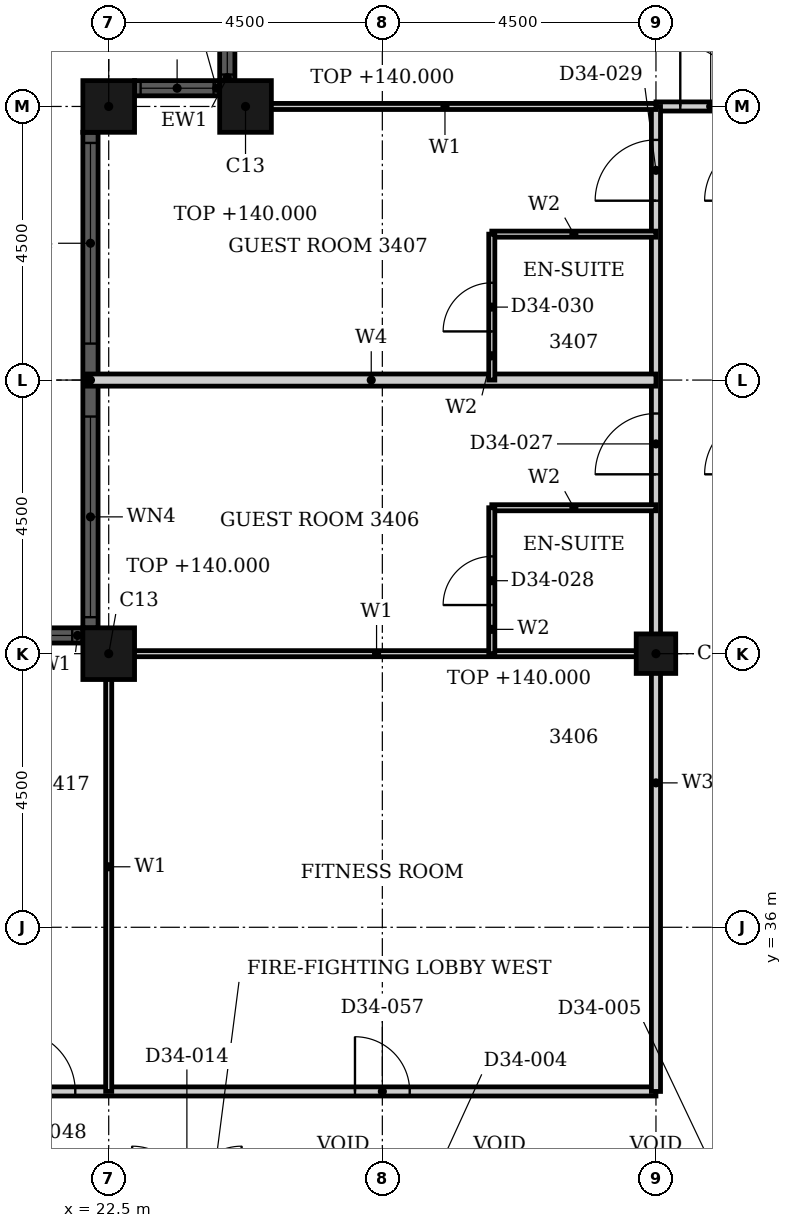
"""IFC4 building model, lengths in metres.
Left out: names, types, materials, properties, quantities, classifications, styles, units other than length and angle.
Written with IfcOpenShell. Run it as: python <this file> out.ifc"""

import sys

from ifc_helpers import new_model, si_unit, direction, frame, frame_2d, origin, origin_2d, place, context, subcontext, project, spatial, rectangle, hollow_rectangle, extrude, element, fill, save


model = new_model("IFC4")
c1 = context("Model", 3, precision=1e-05, world=origin(), true_north=direction((0.0, 1.0)))
c2 = subcontext(c1, "Body", "Model", "MODEL_VIEW")
j1 = project(units=[si_unit("LENGTHUNIT", "METRE"), si_unit("PLANEANGLEUNIT", "RADIAN")], contexts=[c1])
p1 = place(None, origin())
s1 = spatial("IfcSite", under=j1, at=p1, CompositionType="ELEMENT")
p2 = place(p1, origin())
s2 = spatial("IfcBuilding", under=s1, at=p2, CompositionType="ELEMENT")
p3 = place(p2, frame((0.0, 0.0, 136.8)))
s3 = spatial("IfcBuildingStorey", under=s2, at=p3, CompositionType="ELEMENT", Elevation=136.8)
for number, where, z_axis, x_axis in (
    (1, (24.75, 49.5, 0.0), (0.0, 0.0, 1.0), (1.0, 0.0, 0.0)),
    (2, (22.5, 49.5, 0.0), (0.0, 0.0, 1.0), (1.0, 0.0, 0.0)),
    (3, (22.5, 40.5, 0.0), (0.0, 0.0, 1.0), (1.0, 0.0, 0.0)),
):
    element("IfcColumn", number, at=place(p3, frame(where, z_axis=z_axis, x_axis=x_axis)), inside=s3, PredefinedType="COLUMN", context=c2, shape_type="SweptSolid", body=[
        extrude(hollow_rectangle(XDim=0.85, YDim=0.85, WallThickness=0.026, at=origin_2d()), origin(), (0.0, 0.0, 1.0), 3.2),
    ])
p4 = place(p3, frame((31.5, 40.5, 0.0), z_axis=(0.0, 0.0, 1.0), x_axis=(1.0, 0.0, 0.0)))
e4 = element("IfcColumn", 4, at=p4, inside=s3, PredefinedType="COLUMN", context=c2, shape_type="SweptSolid", body=[
    extrude(hollow_rectangle(XDim=0.65, YDim=0.65, WallThickness=0.021, at=origin_2d()), origin(), (0.0, 0.0, 1.0), 3.2),
])
p5 = place(p3, frame((24.45, 51.325, 0.0), z_axis=(0.0, 0.0, 1.0), x_axis=(0.0, -1.0, 0.0)))
e5 = element("IfcWall", 5, at=p5, inside=s3, PredefinedType="SOLIDWALL", context=c2, shape_type="SweptSolid", body=[
    extrude(rectangle(XDim=1.4, YDim=0.25, at=frame_2d((0.7, 0.0))), origin(), (0.0, 0.0, 1.0), 3.6),
])
p6 = place(p5, frame((0.1, 0.0, 0.9)))
e6 = element("IfcOpeningElement", 6, at=p6, cuts=e5, PredefinedType="OPENING", context=c2, shape_type="SweptSolid", body=[
    extrude(rectangle(XDim=1.2, YDim=2.08, at=frame_2d((0.6, 1.04))), frame((0.0, 0.135, 0.0), z_axis=(0.0, -1.0, 0.0), x_axis=(1.0, 0.0, 0.0)), (0.0, 0.0, 1.0), 0.27),
])
p7 = place(p3, frame((24.325, 49.8, 0.0), z_axis=(0.0, 0.0, 1.0), x_axis=(-1.0, 0.0, 0.0)))
e7 = element("IfcWall", 7, at=p7, inside=s3, PredefinedType="SOLIDWALL", context=c2, shape_type="SweptSolid", body=[
    extrude(rectangle(XDim=1.4, YDim=0.25, at=frame_2d((0.7, 0.0))), origin(), (0.0, 0.0, 1.0), 3.6),
])
p8 = place(p7, frame((0.1, 0.0, 0.9)))
e8 = element("IfcOpeningElement", 8, at=p8, cuts=e7, PredefinedType="OPENING", context=c2, shape_type="SweptSolid", body=[
    extrude(rectangle(XDim=1.2, YDim=2.08, at=frame_2d((0.6, 1.04))), frame((0.0, 0.135, 0.0), z_axis=(0.0, -1.0, 0.0), x_axis=(1.0, 0.0, 0.0)), (0.0, 0.0, 1.0), 0.27),
])
p9 = place(p3, frame((22.2, 49.075, 0.0), z_axis=(0.0, 0.0, 1.0), x_axis=(0.0, -1.0, 0.0)))
e9 = element("IfcWall", 9, at=p9, inside=s3, PredefinedType="SOLIDWALL", context=c2, shape_type="SweptSolid", body=[
    extrude(rectangle(XDim=8.15, YDim=0.25, at=frame_2d((4.075, 0.0))), origin(), (0.0, 0.0, 1.0), 3.6),
])
p10 = place(p9, frame((0.175, 0.0, 0.9)))
e10 = element("IfcOpeningElement", 10, at=p10, cuts=e9, PredefinedType="OPENING", context=c2, shape_type="SweptSolid", body=[
    extrude(rectangle(XDim=3.3, YDim=2.08, at=frame_2d((1.65, 1.04))), frame((0.0, 0.135, 0.0), z_axis=(0.0, -1.0, 0.0), x_axis=(1.0, 0.0, 0.0)), (0.0, 0.0, 1.0), 0.27),
])
p11 = place(p9, frame((4.675, 0.0, 0.9)))
e11 = element("IfcOpeningElement", 11, at=p11, cuts=e9, PredefinedType="OPENING", context=c2, shape_type="SweptSolid", body=[
    extrude(rectangle(XDim=3.3, YDim=2.08, at=frame_2d((1.65, 1.04))), frame((0.0, 0.135, 0.0), z_axis=(0.0, -1.0, 0.0), x_axis=(1.0, 0.0, 0.0)), (0.0, 0.0, 1.0), 0.27),
])
p12 = place(p3, frame((22.075, 40.8, 0.0), z_axis=(0.0, 0.0, 1.0), x_axis=(-1.0, 0.0, 0.0)))
e12 = element("IfcWall", 12, at=p12, inside=s3, PredefinedType="SOLIDWALL", context=c2, shape_type="SweptSolid", body=[
    extrude(rectangle(XDim=3.65, YDim=0.25, at=frame_2d((1.825, 0.0))), origin(), (0.0, 0.0, 1.0), 3.6),
])
p13 = place(p12, frame((0.175, 0.0, 0.9)))
e13 = element("IfcOpeningElement", 13, at=p13, cuts=e12, PredefinedType="OPENING", context=c2, shape_type="SweptSolid", body=[
    extrude(rectangle(XDim=3.3, YDim=1.35, at=frame_2d((1.65, 0.675))), frame((0.0, 0.135, 0.0), z_axis=(0.0, -1.0, 0.0), x_axis=(1.0, 0.0, 0.0)), (0.0, 0.0, 1.0), 0.27),
])
p14 = place(p3, frame((16.2, 33.3, 0.0), z_axis=(0.0, 0.0, 1.0), x_axis=(1.0, 0.0, 0.0)))
e14 = element("IfcWall", 14, at=p14, inside=s3, PredefinedType="PARTITIONING", context=c2, shape_type="SweptSolid", body=[
    extrude(rectangle(XDim=15.3, YDim=0.15, at=frame_2d((7.65, 0.0))), origin(), (0.0, 0.0, 1.0), 3.2),
])
p15 = place(p14, frame((4.75, 0.0, 0.0)))
e15 = element("IfcOpeningElement", 15, at=p15, cuts=e14, PredefinedType="OPENING", context=c2, shape_type="SweptSolid", body=[
    extrude(rectangle(XDim=1.0, YDim=2.1, at=frame_2d((0.5, 1.05))), frame((0.0, 0.085, 0.0), z_axis=(0.0, -1.0, 0.0), x_axis=(1.0, 0.0, 0.0)), (0.0, 0.0, 1.0), 0.17),
])
p16 = place(p14, frame((10.35, 0.0, 0.0)))
e16 = element("IfcOpeningElement", 16, at=p16, cuts=e14, PredefinedType="OPENING", context=c2, shape_type="SweptSolid", body=[
    extrude(rectangle(XDim=0.9, YDim=2.1, at=frame_2d((0.45, 1.05))), frame((0.0, 0.085, 0.0), z_axis=(0.0, -1.0, 0.0), x_axis=(1.0, 0.0, 0.0)), (0.0, 0.0, 1.0), 0.17),
])
p17 = place(p3, frame((31.5, 49.5, 0.0), z_axis=(0.0, 0.0, 1.0), x_axis=(1.0, 0.0, 0.0)))
e17 = element("IfcWall", 17, at=p17, inside=s3, PredefinedType="PARTITIONING", context=c2, shape_type="SweptSolid", body=[
    extrude(rectangle(XDim=1.8, YDim=0.15, at=frame_2d((0.9, 0.0))), origin(), (0.0, 0.0, 1.0), 3.2),
])
p18 = place(p17, frame((0.4, 0.0, 0.0)))
e18 = element("IfcOpeningElement", 18, at=p18, cuts=e17, PredefinedType="OPENING", context=c2, shape_type="SweptSolid", body=[
    extrude(rectangle(XDim=1.0, YDim=2.1, at=frame_2d((0.5, 1.05))), frame((0.0, 0.085, 0.0), z_axis=(0.0, -1.0, 0.0), x_axis=(1.0, 0.0, 0.0)), (0.0, 0.0, 1.0), 0.17),
])
p19 = place(p3, frame((31.5, 33.3, 0.0), z_axis=(0.0, 0.0, 1.0), x_axis=(0.0, 1.0, 0.0)))
e19 = element("IfcWall", 19, at=p19, inside=s3, PredefinedType="PARTITIONING", context=c2, shape_type="SweptSolid", body=[
    extrude(rectangle(XDim=16.2, YDim=0.15, at=frame_2d((8.1, 0.0))), origin(), (0.0, 0.0, 1.0), 2.48),
])
p20 = place(p19, frame((10.15, 0.0, 0.0)))
e20 = element("IfcOpeningElement", 20, at=p20, cuts=e19, PredefinedType="OPENING", context=c2, shape_type="SweptSolid", body=[
    extrude(rectangle(XDim=1.0, YDim=2.1, at=frame_2d((0.5, 1.05))), frame((0.0, 0.085, 0.0), z_axis=(0.0, -1.0, 0.0), x_axis=(1.0, 0.0, 0.0)), (0.0, 0.0, 1.0), 0.17),
])
p21 = place(p19, frame((14.65, 0.0, 0.0)))
e21 = element("IfcOpeningElement", 21, at=p21, cuts=e19, PredefinedType="OPENING", context=c2, shape_type="SweptSolid", body=[
    extrude(rectangle(XDim=1.0, YDim=2.1, at=frame_2d((0.5, 1.05))), frame((0.0, 0.085, 0.0), z_axis=(0.0, -1.0, 0.0), x_axis=(1.0, 0.0, 0.0)), (0.0, 0.0, 1.0), 0.17),
])
p22 = place(p3, frame((22.31, 40.5, 0.0), z_axis=(0.0, 0.0, 1.0), x_axis=(1.0, 0.0, 0.0)))
e22 = element("IfcWall", 22, at=p22, inside=s3, PredefinedType="PARTITIONING", context=c2, shape_type="SweptSolid", body=[
    extrude(rectangle(XDim=9.19, YDim=0.1, at=frame_2d((4.595, 0.0))), origin(), (0.0, 0.0, 1.0), 2.268),
])
p23 = place(p3, frame((24.56, 49.5, 0.0), z_axis=(0.0, 0.0, 1.0), x_axis=(1.0, 0.0, 0.0)))
e23 = element("IfcWall", 23, at=p23, inside=s3, PredefinedType="PARTITIONING", context=c2, shape_type="SweptSolid", body=[
    extrude(rectangle(XDim=6.94, YDim=0.1, at=frame_2d((3.47, 0.0))), origin(), (0.0, 0.0, 1.0), 3.2),
])
p24 = place(p3, frame((22.5, 33.3, 0.0), z_axis=(0.0, 0.0, 1.0), x_axis=(0.0, 1.0, 0.0)))
e24 = element("IfcWall", 24, at=p24, inside=s3, PredefinedType="PARTITIONING", context=c2, shape_type="SweptSolid", body=[
    extrude(rectangle(XDim=7.39, YDim=0.1, at=frame_2d((3.695, 0.0))), origin(), (0.0, 0.0, 1.0), 3.2),
])
p25 = place(p3, frame((22.135, 45.0, 0.0), z_axis=(0.0, 0.0, 1.0), x_axis=(1.0, 0.0, 0.0)))
e25 = element("IfcWall", 25, at=p25, inside=s3, PredefinedType="PARTITIONING", context=c2, shape_type="SweptSolid", body=[
    extrude(rectangle(XDim=9.365, YDim=0.2, at=frame_2d((4.683, 0.0))), origin(), (0.0, 0.0, 1.0), 3.2),
])
for number, where, z_axis, x_axis in (
    (26, (28.8, 42.9, 0.0), (0.0, 0.0, 1.0), (1.0, 0.0, 0.0)),
    (27, (28.8, 47.4, 0.0), (0.0, 0.0, 1.0), (1.0, 0.0, 0.0)),
):
    element("IfcWall", number, at=place(p3, frame(where, z_axis=z_axis, x_axis=x_axis)), inside=s3, PredefinedType="PARTITIONING", context=c2, shape_type="SweptSolid", body=[
        extrude(rectangle(XDim=2.7, YDim=0.1, at=frame_2d((1.35, 0.0))), origin(), (0.0, 0.0, 1.0), 3.2),
    ])
p26 = place(p3, frame((28.8, 40.5, 0.0), z_axis=(0.0, 0.0, 1.0), x_axis=(0.0, 1.0, 0.0)))
e28 = element("IfcWall", 28, at=p26, inside=s3, PredefinedType="PARTITIONING", context=c2, shape_type="SweptSolid", body=[
    extrude(rectangle(XDim=2.4, YDim=0.1, at=frame_2d((1.2, 0.0))), origin(), (0.0, 0.0, 1.0), 3.2),
])
p27 = place(p26, frame((0.8, 0.0, 0.0)))
e29 = element("IfcOpeningElement", 29, at=p27, cuts=e28, PredefinedType="OPENING", context=c2, shape_type="SweptSolid", body=[
    extrude(rectangle(XDim=0.8, YDim=2.1, at=frame_2d((0.4, 1.05))), frame((0.0, 0.06, 0.0), z_axis=(0.0, -1.0, 0.0), x_axis=(1.0, 0.0, 0.0)), (0.0, 0.0, 1.0), 0.12),
])
p28 = place(p3, frame((28.8, 45.0, 0.0), z_axis=(0.0, 0.0, 1.0), x_axis=(0.0, 1.0, 0.0)))
e30 = element("IfcWall", 30, at=p28, inside=s3, PredefinedType="PARTITIONING", context=c2, shape_type="SweptSolid", body=[
    extrude(rectangle(XDim=2.4, YDim=0.1, at=frame_2d((1.2, 0.0))), origin(), (0.0, 0.0, 1.0), 3.2),
])
p29 = place(p28, frame((0.8, 0.0, 0.0)))
e31 = element("IfcOpeningElement", 31, at=p29, cuts=e30, PredefinedType="OPENING", context=c2, shape_type="SweptSolid", body=[
    extrude(rectangle(XDim=0.8, YDim=2.1, at=frame_2d((0.4, 1.05))), frame((0.0, 0.06, 0.0), z_axis=(0.0, -1.0, 0.0), x_axis=(1.0, 0.0, 0.0)), (0.0, 0.0, 1.0), 0.12),
])
p30 = place(p6, origin())
e32 = element("IfcWindow", 32, at=p30, inside=s3, PartitioningType="SINGLE_PANEL", PredefinedType="WINDOW", context=c2, shape_type="SweptSolid", body=[
    extrude(rectangle(XDim=1.2, YDim=2.08, at=frame_2d((0.6, 1.04))), frame((0.0, 0.03, 0.0), z_axis=(0.0, -1.0, 0.0), x_axis=(1.0, 0.0, 0.0)), (0.0, 0.0, 1.0), 0.06),
])
fill(e6, e32)
p31 = place(p8, origin())
e33 = element("IfcWindow", 33, at=p31, inside=s3, PartitioningType="SINGLE_PANEL", PredefinedType="WINDOW", context=c2, shape_type="SweptSolid", body=[
    extrude(rectangle(XDim=1.2, YDim=2.08, at=frame_2d((0.6, 1.04))), frame((0.0, 0.03, 0.0), z_axis=(0.0, -1.0, 0.0), x_axis=(1.0, 0.0, 0.0)), (0.0, 0.0, 1.0), 0.06),
])
fill(e8, e33)
p32 = place(p10, origin())
e34 = element("IfcWindow", 34, at=p32, inside=s3, PartitioningType="SINGLE_PANEL", PredefinedType="WINDOW", context=c2, shape_type="SweptSolid", body=[
    extrude(rectangle(XDim=3.3, YDim=2.08, at=frame_2d((1.65, 1.04))), frame((0.0, 0.03, 0.0), z_axis=(0.0, -1.0, 0.0), x_axis=(1.0, 0.0, 0.0)), (0.0, 0.0, 1.0), 0.06),
])
fill(e10, e34)
p33 = place(p11, origin())
e35 = element("IfcWindow", 35, at=p33, inside=s3, PartitioningType="SINGLE_PANEL", PredefinedType="WINDOW", context=c2, shape_type="SweptSolid", body=[
    extrude(rectangle(XDim=3.3, YDim=2.08, at=frame_2d((1.65, 1.04))), frame((0.0, 0.03, 0.0), z_axis=(0.0, -1.0, 0.0), x_axis=(1.0, 0.0, 0.0)), (0.0, 0.0, 1.0), 0.06),
])
fill(e11, e35)
p34 = place(p13, origin())
e36 = element("IfcWindow", 36, at=p34, inside=s3, PartitioningType="SINGLE_PANEL", PredefinedType="WINDOW", context=c2, shape_type="SweptSolid", body=[
    extrude(rectangle(XDim=3.3, YDim=1.35, at=frame_2d((1.65, 0.675))), frame((0.0, 0.03, 0.0), z_axis=(0.0, -1.0, 0.0), x_axis=(1.0, 0.0, 0.0)), (0.0, 0.0, 1.0), 0.06),
])
fill(e13, e36)
p35 = place(p20, origin())
e37 = element("IfcDoor", 37, at=p35, inside=s3, OperationType="SINGLE_SWING_RIGHT", PredefinedType="DOOR", context=c2, shape_type="SweptSolid", body=[
    extrude(rectangle(XDim=1.0, YDim=2.1, at=frame_2d((0.5, 1.05))), frame((0.0, 0.025, 0.0), z_axis=(0.0, -1.0, 0.0), x_axis=(1.0, 0.0, 0.0)), (0.0, 0.0, 1.0), 0.05),
])
fill(e20, e37)
p36 = place(p27, origin())
e38 = element("IfcDoor", 38, at=p36, inside=s3, OperationType="SINGLE_SWING_LEFT", PredefinedType="DOOR", context=c2, shape_type="SweptSolid", body=[
    extrude(rectangle(XDim=0.8, YDim=2.1, at=frame_2d((0.4, 1.05))), frame((0.0, 0.025, 0.0), z_axis=(0.0, -1.0, 0.0), x_axis=(1.0, 0.0, 0.0)), (0.0, 0.0, 1.0), 0.05),
])
fill(e29, e38)
p37 = place(p21, origin())
e39 = element("IfcDoor", 39, at=p37, inside=s3, OperationType="SINGLE_SWING_RIGHT", PredefinedType="DOOR", context=c2, shape_type="SweptSolid", body=[
    extrude(rectangle(XDim=1.0, YDim=2.1, at=frame_2d((0.5, 1.05))), frame((0.0, 0.025, 0.0), z_axis=(0.0, -1.0, 0.0), x_axis=(1.0, 0.0, 0.0)), (0.0, 0.0, 1.0), 0.05),
])
fill(e21, e39)
p38 = place(p29, origin())
e40 = element("IfcDoor", 40, at=p38, inside=s3, OperationType="SINGLE_SWING_LEFT", PredefinedType="DOOR", context=c2, shape_type="SweptSolid", body=[
    extrude(rectangle(XDim=0.8, YDim=2.1, at=frame_2d((0.4, 1.05))), frame((0.0, 0.025, 0.0), z_axis=(0.0, -1.0, 0.0), x_axis=(1.0, 0.0, 0.0)), (0.0, 0.0, 1.0), 0.05),
])
fill(e31, e40)
p39 = place(p18, origin())
e41 = element("IfcDoor", 41, at=p39, inside=s3, OperationType="SINGLE_SWING_RIGHT", PredefinedType="DOOR", context=c2, shape_type="SweptSolid", body=[
    extrude(rectangle(XDim=1.0, YDim=2.1, at=frame_2d((0.5, 1.05))), frame((0.0, 0.025, 0.0), z_axis=(0.0, -1.0, 0.0), x_axis=(1.0, 0.0, 0.0)), (0.0, 0.0, 1.0), 0.05),
])
fill(e18, e41)
p40 = place(p15, origin())
e42 = element("IfcDoor", 42, at=p40, inside=s3, OperationType="SINGLE_SWING_RIGHT", PredefinedType="DOOR", context=c2, shape_type="SweptSolid", body=[
    extrude(rectangle(XDim=1.0, YDim=2.1, at=frame_2d((0.5, 1.05))), frame((0.0, 0.025, 0.0), z_axis=(0.0, -1.0, 0.0), x_axis=(1.0, 0.0, 0.0)), (0.0, 0.0, 1.0), 0.05),
])
fill(e15, e42)
p41 = place(p16, origin())
e43 = element("IfcDoor", 43, at=p41, inside=s3, OperationType="SINGLE_SWING_RIGHT", PredefinedType="DOOR", context=c2, shape_type="SweptSolid", body=[
    extrude(rectangle(XDim=0.9, YDim=2.1, at=frame_2d((0.45, 1.05))), frame((0.0, 0.025, 0.0), z_axis=(0.0, -1.0, 0.0), x_axis=(1.0, 0.0, 0.0)), (0.0, 0.0, 1.0), 0.05),
])
fill(e16, e43)
save(model, sys.argv[1])
